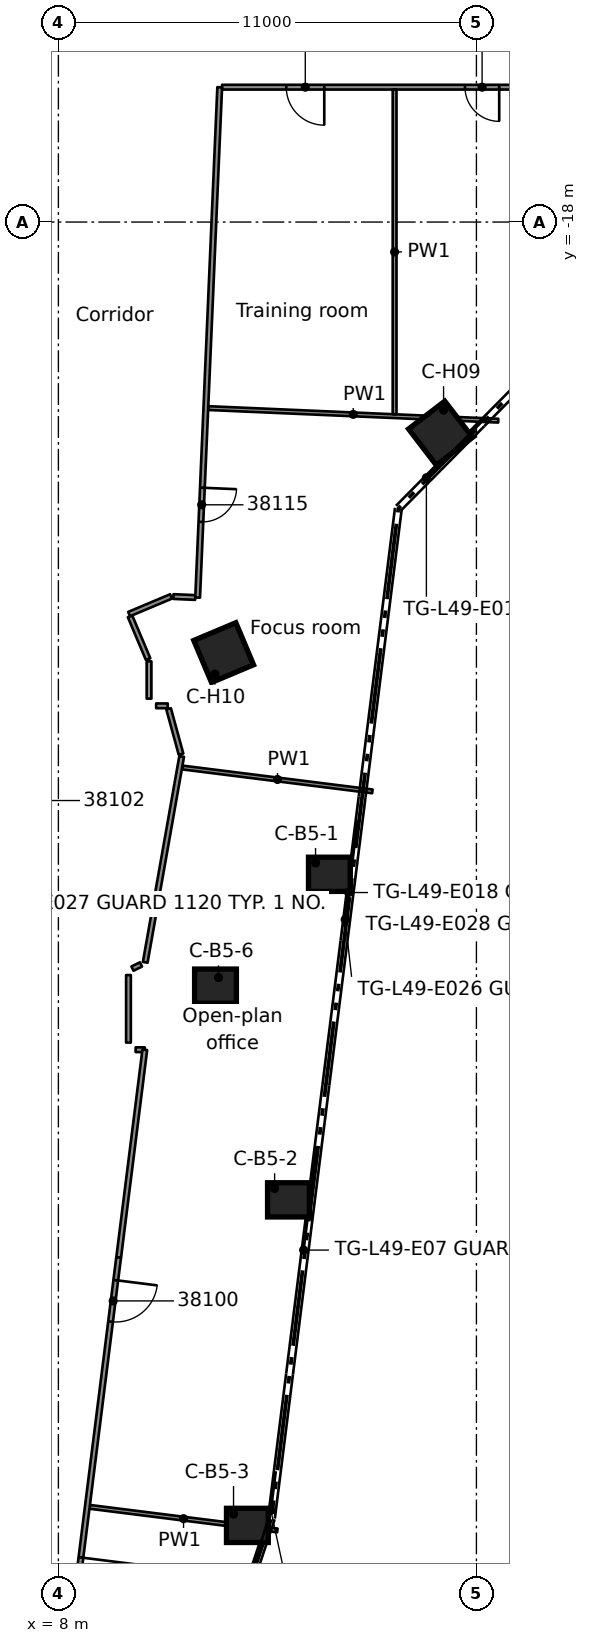
"""IFC4 building model, lengths in metres.
Left out: names, types, materials, properties, quantities, classifications, styles, units other than length and angle.
Written with IfcOpenShell. Run it as: python <this file> out.ifc"""

import sys

from ifc_helpers import new_model, si_unit, direction, frame, frame_2d, origin, origin_2d, place, context, subcontext, project, spatial, rectangle, extrude, element, fill, save


model = new_model("IFC4")
c1 = context("Model", 3, precision=1e-05, world=origin(), true_north=direction((0.0, 1.0)))
c2 = subcontext(c1, "Body", "Model", "MODEL_VIEW")
j1 = project(units=[si_unit("LENGTHUNIT", "METRE"), si_unit("PLANEANGLEUNIT", "RADIAN")], contexts=[c1])
p1 = place(None, origin())
s1 = spatial("IfcSite", under=j1, at=p1, CompositionType="ELEMENT")
p2 = place(p1, origin())
s2 = spatial("IfcBuilding", under=s1, at=p2, CompositionType="ELEMENT")
p3 = place(p2, frame((0.0, 0.0, 188.6)))
s3 = spatial("IfcBuildingStorey", under=s2, at=p3, CompositionType="ELEMENT", Elevation=188.6)
for number, where, z_axis, x_axis in (
    (1, (15.131, -35.162, 0.0), (0.0, 0.0, 1.0), (1.0, 0.0, 0.0)),
    (2, (14.054, -43.728, 0.0), (0.0, 0.0, 1.0), (1.0, 0.0, 0.0)),
    (3, (12.973, -52.294, 0.0), (0.0, 0.0, 1.0), (1.0, 0.0, 0.0)),
    (4, (12.134, -38.105, 0.0), (0.0, 0.0, 1.0), (1.0, 0.0, 0.0)),
):
    element("IfcColumn", number, at=place(p3, frame(where, z_axis=z_axis, x_axis=x_axis)), inside=s3, PredefinedType="COLUMN", context=c2, shape_type="SweptSolid", body=[
        extrude(rectangle(XDim=1.1, YDim=0.9, at=origin_2d()), origin(), (0.0, 0.0, 1.0), 3.5),
    ])
for number, where, z_axis, x_axis in (
    (5, (18.056, -23.555, 0.0), (0.0, 0.0, 1.0), (0.608, -0.794, 0.0)),
    (6, (12.349, -29.329, 0.0), (0.0, 0.0, 1.0), (0.388, -0.922, 0.0)),
):
    element("IfcColumn", number, at=place(p3, frame(where, z_axis=z_axis, x_axis=x_axis)), inside=s3, PredefinedType="COLUMN", context=c2, shape_type="SweptSolid", body=[
        extrude(rectangle(XDim=1.2, YDim=1.2, at=origin_2d()), origin(), (0.0, 0.0, 1.0), 3.5),
    ])
p4 = place(p3, frame((11.227, -32.001, 0.0), z_axis=(0.0, 0.0, 1.0), x_axis=(-0.264486640985, 0.964389349143, 0.0)))
e7 = element("IfcWall", 7, at=p4, inside=s3, PredefinedType="PARTITIONING", context=c2, shape_type="SweptSolid", body=[
    extrude(rectangle(XDim=1.237, YDim=0.125, at=frame_2d((0.618, 0.0))), origin(), (0.0, 0.0, 1.0), 3.06),
])
p5 = place(p3, frame((9.885, -28.373, 0.0), z_axis=(0.0, 0.0, 1.0), x_axis=(0.388859205029, -0.921297193453, 0.0)))
e8 = element("IfcWall", 8, at=p5, inside=s3, PredefinedType="PARTITIONING", context=c2, shape_type="SweptSolid", body=[
    extrude(rectangle(XDim=1.224, YDim=0.125, at=frame_2d((0.612, 0.0))), origin(), (0.0, 0.0, 1.0), 3.06),
])
p6 = place(p3, frame((8.824, -51.806, 0.0), z_axis=(0.0, 0.0, 1.0), x_axis=(0.992182494256, -0.124795424967, 0.0)))
e9 = element("IfcWall", 9, at=p6, inside=s3, PredefinedType="PARTITIONING", context=c2, shape_type="SweptSolid", body=[
    extrude(rectangle(XDim=4.977, YDim=0.1, at=frame_2d((2.488, 0.0))), origin(), (0.0, 0.0, 1.0), 3.06),
])
p7 = place(p3, frame((11.27, -32.353, 0.0), z_axis=(0.0, 0.0, 1.0), x_axis=(0.992205292303, -0.124614035831, 0.0)))
e10 = element("IfcWall", 10, at=p7, inside=s3, PredefinedType="PARTITIONING", context=c2, shape_type="SweptSolid", body=[
    extrude(rectangle(XDim=5.031, YDim=0.1, at=frame_2d((2.516, 0.0))), origin(), (0.0, 0.0, 1.0), 3.06),
])
p8 = place(p3, frame((11.026, -27.854, 0.0), z_axis=(0.0, 0.0, 1.0), x_axis=(0.999064142369, -0.04325320141, 0.0)))
e11 = element("IfcWall", 11, at=p8, inside=s3, PredefinedType="PARTITIONING", context=c2, shape_type="SweptSolid", body=[
    extrude(rectangle(XDim=0.576, YDim=0.125, at=frame_2d((0.288, 0.0))), origin(), (0.0, 0.0, 1.0), 3.06),
])
p9 = place(p3, frame((11.942, -22.895, 0.0), z_axis=(0.0, 0.0, 1.0), x_axis=(0.999060795111, -0.043330447407, 0.0)))
e12 = element("IfcWall", 12, at=p9, inside=s3, PredefinedType="PARTITIONING", context=c2, shape_type="SweptSolid", body=[
    extrude(rectangle(XDim=7.64, YDim=0.1, at=frame_2d((3.82, 0.0))), origin(), (0.0, 0.0, 1.0), 3.06),
])
p10 = place(p3, frame((10.032, -39.778, 0.0), z_axis=(0.0, 0.0, 1.0), x_axis=(1.0, 0.0, 0.0)))
e13 = element("IfcWall", 13, at=p10, inside=s3, PredefinedType="PARTITIONING", context=c2, shape_type="SweptSolid", body=[
    extrude(rectangle(XDim=0.242, YDim=0.125, at=frame_2d((0.121, 0.0))), origin(), (0.0, 0.0, 1.0), 3.06),
])
p11 = place(p3, frame((10.573, -30.729, 0.0), z_axis=(0.0, 0.0, 1.0), x_axis=(1.0, 0.0, 0.0)))
e14 = element("IfcWall", 14, at=p11, inside=s3, PredefinedType="PARTITIONING", context=c2, shape_type="SweptSolid", body=[
    extrude(rectangle(XDim=0.305, YDim=0.125, at=frame_2d((0.152, 0.0))), origin(), (0.0, 0.0, 1.0), 3.06),
])
p12 = place(p3, frame((21.387, -14.451, 0.0), z_axis=(0.0, 0.0, 1.0), x_axis=(-1.0, 0.0, 0.0)))
e15 = element("IfcWall", 15, at=p12, inside=s3, PredefinedType="PARTITIONING", context=c2, shape_type="SweptSolid", body=[
    extrude(rectangle(XDim=9.08, YDim=0.125, at=frame_2d((4.54, 0.0))), origin(), (0.0, 0.0, 1.0), 3.06),
])
p13 = place(p12, frame((6.39, 0.0, 0.0)))
e16 = element("IfcOpeningElement", 16, at=p13, cuts=e15, PredefinedType="OPENING", context=c2, shape_type="SweptSolid", body=[
    extrude(rectangle(XDim=1.0, YDim=2.1, at=frame_2d((0.5, 1.05))), frame((0.0, 0.073, 0.0), z_axis=(0.0, -1.0, 0.0), x_axis=(1.0, 0.0, 0.0)), (0.0, 0.0, 1.0), 0.145),
])
p14 = place(p12, frame((1.788, 0.0, 0.0)))
e17 = element("IfcOpeningElement", 17, at=p14, cuts=e15, PredefinedType="OPENING", context=c2, shape_type="SweptSolid", body=[
    extrude(rectangle(XDim=0.9, YDim=2.1, at=frame_2d((0.45, 1.05))), frame((0.0, 0.073, 0.0), z_axis=(0.0, -1.0, 0.0), x_axis=(1.0, 0.0, 0.0)), (0.0, 0.0, 1.0), 0.145),
])
p15 = place(p3, frame((9.861, -28.315, 0.0), z_axis=(0.0, 0.0, 1.0), x_axis=(0.921804272002, 0.387655625676, 0.0)))
e18 = element("IfcWall", 18, at=p15, inside=s3, PredefinedType="PARTITIONING", context=c2, shape_type="SweptSolid", body=[
    extrude(rectangle(XDim=1.197, YDim=0.125, at=frame_2d((0.598, 0.0))), origin(), (0.0, 0.0, 1.0), 3.06),
])
p16 = place(p3, frame((9.949, -37.644, 0.0), z_axis=(0.0, 0.0, 1.0), x_axis=(0.897533961659, 0.440945334105, 0.0)))
e19 = element("IfcWall", 19, at=p16, inside=s3, PredefinedType="PARTITIONING", context=c2, shape_type="SweptSolid", body=[
    extrude(rectangle(XDim=0.25, YDim=0.125, at=frame_2d((0.125, 0.0))), origin(), (0.0, 0.0, 1.0), 3.06),
])
p17 = place(p3, frame((9.586, -45.246, 0.0), z_axis=(0.0, 0.0, 1.0), x_axis=(0.124858127037, 0.992174605658, 0.0)))
e20 = element("IfcWall", 20, at=p17, inside=s3, PredefinedType="PARTITIONING", context=c2, shape_type="SweptSolid", body=[
    extrude(rectangle(XDim=5.51, YDim=0.125, at=frame_2d((2.755, 0.0))), origin(), (0.0, 0.0, 1.0), 3.06),
])
p18 = place(p3, frame((11.244, -32.061, 0.0), z_axis=(0.0, 0.0, 1.0), x_axis=(-0.174322029995, -0.984688696928, 0.0)))
e21 = element("IfcWall", 21, at=p18, inside=s3, PredefinedType="PARTITIONING", context=c2, shape_type="SweptSolid", body=[
    extrude(rectangle(XDim=5.501, YDim=0.125, at=frame_2d((2.75, 0.0))), origin(), (0.0, 0.0, 1.0), 3.06),
])
p19 = place(p3, frame((9.585, -45.246, 0.0), z_axis=(0.0, 0.0, 1.0), x_axis=(-0.124682713734, -0.992196664425, 0.0)))
e22 = element("IfcWall", 22, at=p19, inside=s3, PredefinedType="PARTITIONING", context=c2, shape_type="SweptSolid", body=[
    extrude(rectangle(XDim=10.619, YDim=0.125, at=frame_2d((5.309, 0.0))), origin(), (0.0, 0.0, 1.0), 3.06),
])
p20 = place(p19, frame((0.6, 0.0, 0.0)))
e23 = element("IfcOpeningElement", 23, at=p20, cuts=e22, PredefinedType="OPENING", context=c2, shape_type="SweptSolid", body=[
    extrude(rectangle(XDim=1.1, YDim=2.1, at=frame_2d((0.55, 1.05))), frame((0.0, 0.073, 0.0), z_axis=(0.0, -1.0, 0.0), x_axis=(1.0, 0.0, 0.0)), (0.0, 0.0, 1.0), 0.145),
])
p21 = place(p19, frame((7.954, 0.0, 0.0)))
e24 = element("IfcOpeningElement", 24, at=p21, cuts=e22, PredefinedType="OPENING", context=c2, shape_type="SweptSolid", body=[
    extrude(rectangle(XDim=1.8, YDim=2.1, at=frame_2d((0.9, 1.05))), frame((0.0, 0.073, 0.0), z_axis=(0.0, -1.0, 0.0), x_axis=(1.0, 0.0, 0.0)), (0.0, 0.0, 1.0), 0.145),
])
p22 = place(p3, frame((12.245, -14.453, 0.0), z_axis=(0.0, 0.0, 1.0), x_axis=(-0.043230700279, -0.999065116273, 0.0)))
e25 = element("IfcWall", 25, at=p22, inside=s3, PredefinedType="PARTITIONING", context=c2, shape_type="SweptSolid", body=[
    extrude(rectangle(XDim=13.441, YDim=0.125, at=frame_2d((6.72, 0.0))), origin(), (0.0, 0.0, 1.0), 3.06),
])
p23 = place(p22, frame((10.547, 0.0, 0.0)))
e26 = element("IfcOpeningElement", 26, at=p23, cuts=e25, PredefinedType="OPENING", context=c2, shape_type="SweptSolid", body=[
    extrude(rectangle(XDim=0.9, YDim=2.1, at=frame_2d((0.45, 1.05))), frame((0.0, 0.073, 0.0), z_axis=(0.0, -1.0, 0.0), x_axis=(1.0, 0.0, 0.0)), (0.0, 0.0, 1.0), 0.145),
])
p24 = place(p3, frame((16.847, -23.057, 0.0), z_axis=(0.0, 0.0, 1.0), x_axis=(0.0, 1.0, 0.0)))
e27 = element("IfcWall", 27, at=p24, inside=s3, PredefinedType="PARTITIONING", context=c2, shape_type="SweptSolid", body=[
    extrude(rectangle(XDim=8.543, YDim=0.1, at=frame_2d((4.271, 0.0))), origin(), (0.0, 0.0, 1.0), 3.06),
])
p25 = place(p3, frame((10.385, -30.54, 0.0), z_axis=(0.0, 0.0, 1.0), x_axis=(0.0, 1.0, 0.0)))
e28 = element("IfcWall", 28, at=p25, inside=s3, PredefinedType="PARTITIONING", context=c2, shape_type="SweptSolid", body=[
    extrude(rectangle(XDim=0.981, YDim=0.125, at=frame_2d((0.49, 0.0))), origin(), (0.0, 0.0, 1.0), 3.06),
])
p26 = place(p3, frame((9.844, -39.59, 0.0), z_axis=(0.0, 0.0, 1.0), x_axis=(0.0, 1.0, 0.0)))
e29 = element("IfcWall", 29, at=p26, inside=s3, PredefinedType="PARTITIONING", context=c2, shape_type="SweptSolid", body=[
    extrude(rectangle(XDim=1.777, YDim=0.125, at=frame_2d((0.889, 0.0))), origin(), (0.0, 0.0, 1.0), 3.06),
])
p27 = place(p20, origin())
e30 = element("IfcDoor", 30, at=p27, inside=s3, OperationType="SINGLE_SWING_LEFT", PredefinedType="DOOR", context=c2, shape_type="SweptSolid", body=[
    extrude(rectangle(XDim=1.1, YDim=2.1, at=frame_2d((0.55, 1.05))), frame((0.0, 0.025, 0.0), z_axis=(0.0, -1.0, 0.0), x_axis=(1.0, 0.0, 0.0)), (0.0, 0.0, 1.0), 0.05),
])
fill(e23, e30)
p28 = place(p21, origin())
e31 = element("IfcDoor", 31, at=p28, inside=s3, OperationType="DOUBLE_DOOR_SINGLE_SWING", PredefinedType="DOOR", context=c2, shape_type="SweptSolid", body=[
    extrude(rectangle(XDim=1.8, YDim=2.1, at=frame_2d((0.9, 1.05))), frame((0.0, 0.025, 0.0), z_axis=(0.0, -1.0, 0.0), x_axis=(1.0, 0.0, 0.0)), (0.0, 0.0, 1.0), 0.05),
])
fill(e24, e31)
p29 = place(p23, origin())
e32 = element("IfcDoor", 32, at=p29, inside=s3, OperationType="SINGLE_SWING_RIGHT", PredefinedType="DOOR", context=c2, shape_type="SweptSolid", body=[
    extrude(rectangle(XDim=0.9, YDim=2.1, at=frame_2d((0.45, 1.05))), frame((0.0, 0.025, 0.0), z_axis=(0.0, -1.0, 0.0), x_axis=(1.0, 0.0, 0.0)), (0.0, 0.0, 1.0), 0.05),
])
fill(e26, e32)
p30 = place(p13, origin())
e33 = element("IfcDoor", 33, at=p30, inside=s3, OperationType="SINGLE_SWING_RIGHT", PredefinedType="DOOR", context=c2, shape_type="SweptSolid", body=[
    extrude(rectangle(XDim=1.0, YDim=2.1, at=frame_2d((0.5, 1.05))), frame((0.0, 0.025, 0.0), z_axis=(0.0, -1.0, 0.0), x_axis=(1.0, 0.0, 0.0)), (0.0, 0.0, 1.0), 0.05),
])
fill(e16, e33)
p31 = place(p14, origin())
e34 = element("IfcDoor", 34, at=p31, inside=s3, OperationType="SINGLE_SWING_LEFT", PredefinedType="DOOR", context=c2, shape_type="SweptSolid", body=[
    extrude(rectangle(XDim=0.9, YDim=2.1, at=frame_2d((0.45, 1.05))), frame((0.0, 0.025, 0.0), z_axis=(0.0, -1.0, 0.0), x_axis=(1.0, 0.0, 0.0)), (0.0, 0.0, 1.0), 0.05),
])
fill(e17, e34)
save(model, sys.argv[1])
